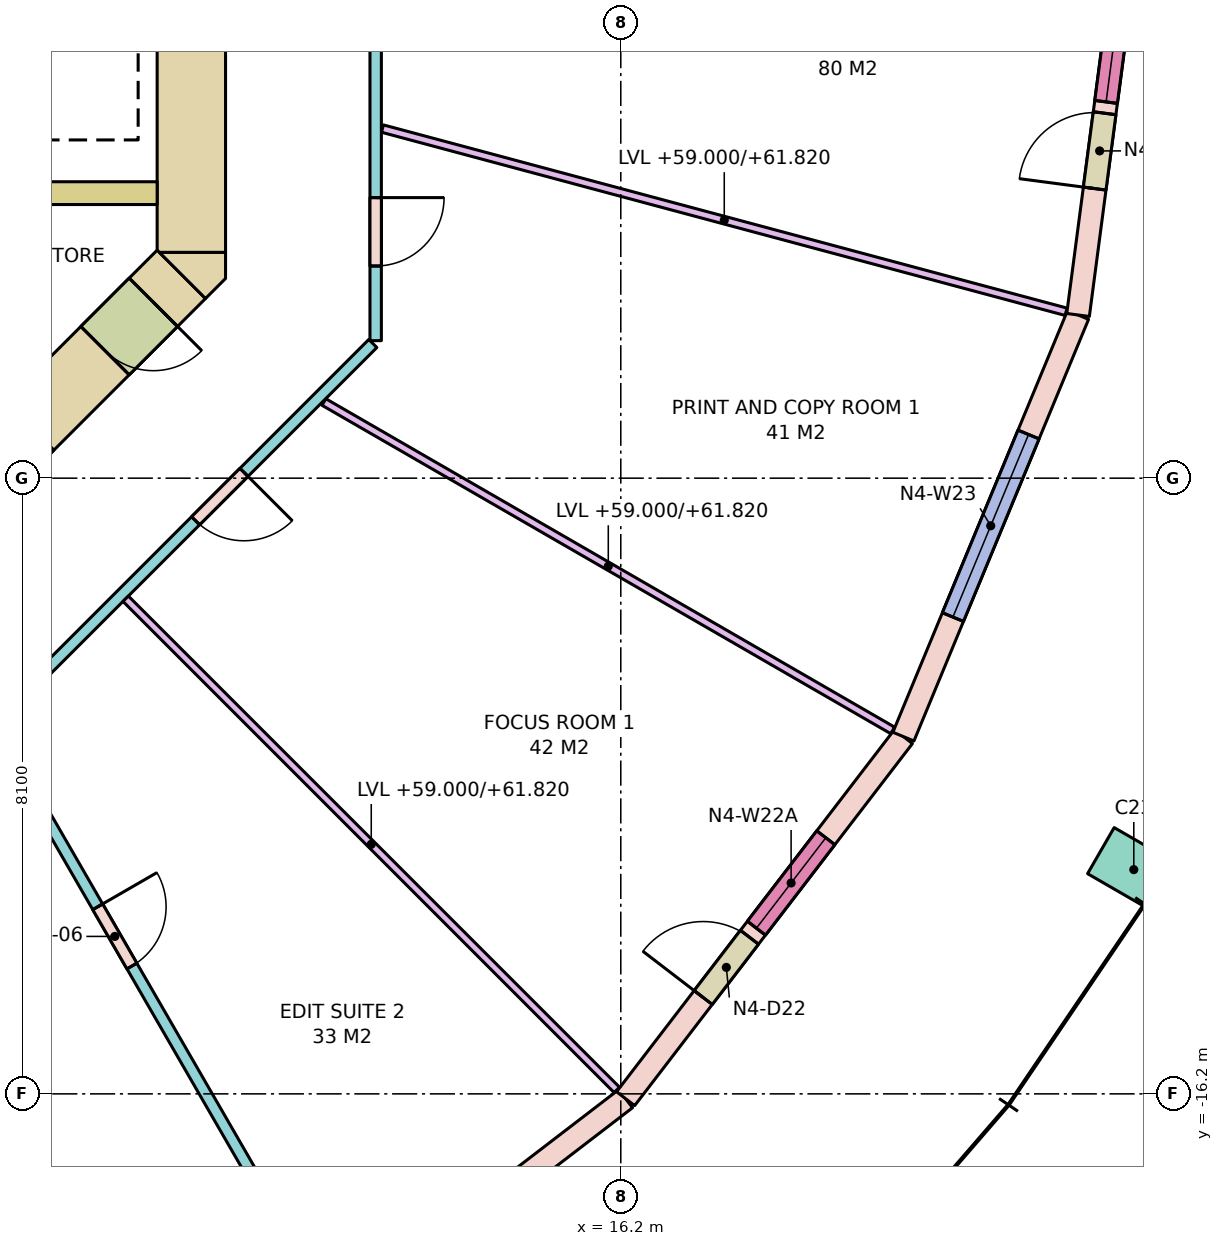
"""IFC4 building model, lengths in metres.
Left out: names, types, materials, properties, quantities, classifications, styles, units other than length and angle.
Written with IfcOpenShell. Run it as: python <this file> out.ifc"""

import sys

from ifc_helpers import new_model, si_unit, direction, frame, frame_2d, origin, origin_2d, place, context, subcontext, project, spatial, polyline, rectangle, outline, extrude, element, fill, save


model = new_model("IFC4")
c1 = context("Model", 3, precision=1e-05, world=origin(), true_north=direction((0.0, 1.0)))
c2 = subcontext(c1, "Body", "Model", "MODEL_VIEW")
j1 = project(units=[si_unit("LENGTHUNIT", "METRE"), si_unit("PLANEANGLEUNIT", "RADIAN")], contexts=[c1])
p1 = place(None, origin())
s1 = spatial("IfcSite", under=j1, at=p1, CompositionType="ELEMENT")
p2 = place(p1, origin())
s2 = spatial("IfcBuilding", under=s1, at=p2, CompositionType="ELEMENT")
p3 = place(p2, frame((0.0, 0.0, 59.0)))
s3 = spatial("IfcBuildingStorey", under=s2, at=p3, CompositionType="ELEMENT", Elevation=59.0)
p4 = place(p3, frame((22.95, -13.25, 0.0), z_axis=(0.0, 0.0, 1.0), x_axis=(0.5, 0.866025403784, 0.0)))
e1 = element("IfcColumn", 1, at=p4, inside=s3, PredefinedType="COLUMN", context=c2, shape_type="SweptSolid", body=[
    extrude(rectangle(XDim=0.7, YDim=1.0, at=origin_2d()), origin(), (0.0, 0.0, 1.0), 4.0),
])
p5 = place(p3, frame((10.55, -5.13, -0.28), z_axis=(0.0, 0.0, 1.0), x_axis=(0.0, 1.0, 0.0)))
e2 = element("IfcWall", 2, at=p5, inside=s3, PredefinedType="SHEAR", context=c2, shape_type="SweptSolid", body=[
    extrude(rectangle(XDim=10.26, YDim=0.9, at=frame_2d((5.13, 0.0))), origin(), (0.0, 0.0, 1.0), 4.0),
])
p6 = place(p5, frame((4.13, 0.0, 0.28)))
e3 = element("IfcOpeningElement", 3, at=p6, cuts=e2, PredefinedType="OPENING", context=c2, shape_type="SweptSolid", body=[
    extrude(rectangle(XDim=2.0, YDim=2.1, at=frame_2d((1.0, 1.05))), frame((0.0, 0.46, 0.0), z_axis=(0.0, -1.0, 0.0), x_axis=(1.0, 0.0, 0.0)), (0.0, 0.0, 1.0), 0.92),
])
p7 = place(p3, frame((10.418, -5.418, -0.28), z_axis=(0.0, 0.0, 1.0), x_axis=(-0.707106781187, -0.707106781187, 0.0)))
e4 = element("IfcWall", 4, at=p7, inside=s3, PredefinedType="SHEAR", context=c2, shape_type="SweptSolid", body=[
    extrude(rectangle(XDim=4.243, YDim=0.9, at=frame_2d((2.121, 0.0))), origin(), (0.0, 0.0, 1.0), 4.0),
])
p8 = place(p7, frame((2.823, 0.0, 0.28)))
e5 = element("IfcOpeningElement", 5, at=p8, cuts=e4, PredefinedType="OPENING", context=c2, shape_type="SweptSolid", body=[
    extrude(rectangle(XDim=0.9, YDim=2.1, at=frame_2d((0.45, 1.05))), frame((0.0, 0.46, 0.0), z_axis=(0.0, -1.0, 0.0), x_axis=(1.0, 0.0, 0.0)), (0.0, 0.0, 1.0), 0.92),
])
p9 = place(p7, frame((0.52, 0.0, 0.28)))
e6 = element("IfcOpeningElement", 6, at=p9, cuts=e4, PredefinedType="OPENING", context=c2, shape_type="SweptSolid", body=[
    extrude(rectangle(XDim=0.9, YDim=2.1, at=frame_2d((0.45, 1.05))), frame((0.0, 0.46, 0.0), z_axis=(0.0, -1.0, 0.0), x_axis=(1.0, 0.0, 0.0)), (0.0, 0.0, 1.0), 0.92),
])
p10 = place(p3, frame((0.0, 0.0, -0.28)))
e7 = element("IfcWall", 7, at=p10, inside=s3, PredefinedType="SHEAR", context=c2, shape_type="SweptSolid", body=[
    extrude(outline(polyline([(11.0, -5.473), (10.736, -5.736), (10.13, -5.13), (11.0, -5.13), (11.0, -5.473)])), origin(), (0.0, 0.0, 1.0), 4.0),
])
p11 = place(p3, frame((2.0, -4.35, 0.0), z_axis=(0.0, 0.0, 1.0), x_axis=(1.0, 0.0, 0.0)))
e8 = element("IfcWall", 8, at=p11, inside=s3, PredefinedType="SOLIDWALL", context=c2, shape_type="SweptSolid", body=[
    extrude(rectangle(XDim=8.1, YDim=0.3, at=frame_2d((4.05, 0.0))), origin(), (0.0, 0.0, 1.0), 3.72),
])
p12 = place(p3, frame((11.5, -19.919, 0.0), z_axis=(0.0, 0.0, 1.0), x_axis=(0.793339924758, 0.608778912074, 0.0)))
e9 = element("IfcWall", 9, at=p12, inside=s3, PredefinedType="STANDARD", context=c2, shape_type="SweptSolid", body=[
    extrude(rectangle(XDim=6.004, YDim=0.3, at=frame_2d((3.002, 0.0))), origin(), (0.0, 0.0, 1.0), 3.72),
])
p13 = place(p12, frame((1.702, 0.0, 0.8)))
e10 = element("IfcOpeningElement", 10, at=p13, cuts=e9, PredefinedType="OPENING", context=c2, shape_type="SweptSolid", body=[
    extrude(rectangle(XDim=2.6, YDim=2.7, at=frame_2d((1.3, 1.35))), frame((0.0, 0.16, 0.0), z_axis=(0.0, -1.0, 0.0), x_axis=(1.0, 0.0, 0.0)), (0.0, 0.0, 1.0), 0.32),
])
p14 = place(p3, frame((16.263, -16.263, 0.0), z_axis=(0.0, 0.0, 1.0), x_axis=(0.608778912074, 0.793339924758, 0.0)))
e11 = element("IfcWall", 11, at=p14, inside=s3, PredefinedType="STANDARD", context=c2, shape_type="SweptSolid", body=[
    extrude(rectangle(XDim=6.004, YDim=0.3, at=frame_2d((3.002, 0.0))), origin(), (0.0, 0.0, 1.0), 3.72),
])
p15 = place(p14, frame((1.677, 0.0, 0.0)))
e12 = element("IfcOpeningElement", 12, at=p15, cuts=e11, PredefinedType="OPENING", context=c2, shape_type="SweptSolid", body=[
    extrude(rectangle(XDim=1.0, YDim=2.4, at=frame_2d((0.5, 1.2))), frame((0.0, 0.16, 0.0), z_axis=(0.0, -1.0, 0.0), x_axis=(1.0, 0.0, 0.0)), (0.0, 0.0, 1.0), 0.32),
])
p16 = place(p14, frame((2.827, 0.0, 0.8)))
e13 = element("IfcOpeningElement", 13, at=p16, cuts=e11, PredefinedType="OPENING", context=c2, shape_type="SweptSolid", body=[
    extrude(rectangle(XDim=1.5, YDim=2.7, at=frame_2d((0.75, 1.35))), frame((0.0, 0.16, 0.0), z_axis=(0.0, -1.0, 0.0), x_axis=(1.0, 0.0, 0.0)), (0.0, 0.0, 1.0), 0.32),
])
p17 = place(p3, frame((19.919, -11.5, 0.0), z_axis=(0.0, 0.0, 1.0), x_axis=(0.382671411433, 0.923884511653, 0.0)))
e14 = element("IfcWall", 14, at=p17, inside=s3, PredefinedType="STANDARD", context=c2, shape_type="SweptSolid", body=[
    extrude(rectangle(XDim=6.004, YDim=0.3, at=frame_2d((3.002, 0.0))), origin(), (0.0, 0.0, 1.0), 3.72),
])
p18 = place(p17, frame((1.702, 0.0, 0.8)))
e15 = element("IfcOpeningElement", 15, at=p18, cuts=e14, PredefinedType="OPENING", context=c2, shape_type="SweptSolid", body=[
    extrude(rectangle(XDim=2.6, YDim=2.7, at=frame_2d((1.3, 1.35))), frame((0.0, 0.16, 0.0), z_axis=(0.0, -1.0, 0.0), x_axis=(1.0, 0.0, 0.0)), (0.0, 0.0, 1.0), 0.32),
])
p19 = place(p3, frame((22.216, -5.953, 0.0), z_axis=(0.0, 0.0, 1.0), x_axis=(0.130522880875, 0.991445297315, 0.0)))
e16 = element("IfcWall", 16, at=p19, inside=s3, PredefinedType="STANDARD", context=c2, shape_type="SweptSolid", body=[
    extrude(rectangle(XDim=6.004, YDim=0.3, at=frame_2d((3.002, 0.0))), origin(), (0.0, 0.0, 1.0), 3.72),
])
p20 = place(p19, frame((1.677, 0.0, 0.0)))
e17 = element("IfcOpeningElement", 17, at=p20, cuts=e16, PredefinedType="OPENING", context=c2, shape_type="SweptSolid", body=[
    extrude(rectangle(XDim=1.0, YDim=2.4, at=frame_2d((0.5, 1.2))), frame((0.0, 0.16, 0.0), z_axis=(0.0, -1.0, 0.0), x_axis=(1.0, 0.0, 0.0)), (0.0, 0.0, 1.0), 0.32),
])
p21 = place(p19, frame((2.827, 0.0, 0.8)))
e18 = element("IfcOpeningElement", 18, at=p21, cuts=e16, PredefinedType="OPENING", context=c2, shape_type="SweptSolid", body=[
    extrude(rectangle(XDim=1.5, YDim=2.7, at=frame_2d((0.75, 1.35))), frame((0.0, 0.16, 0.0), z_axis=(0.0, -1.0, 0.0), x_axis=(1.0, 0.0, 0.0)), (0.0, 0.0, 1.0), 0.32),
])
p22 = place(p3, frame((12.975, 2.234, 0.0), z_axis=(0.0, 0.0, 1.0), x_axis=(0.0, -1.0, 0.0)))
e19 = element("IfcWall", 19, at=p22, inside=s3, PredefinedType="PARTITIONING", context=c2, shape_type="SweptSolid", body=[
    extrude(rectangle(XDim=8.525, YDim=0.15, at=frame_2d((4.263, 0.0))), origin(), (0.0, 0.0, 1.0), 2.82),
])
p23 = place(p22, frame((6.643, 0.0, 0.0)))
e20 = element("IfcOpeningElement", 20, at=p23, cuts=e19, PredefinedType="OPENING", context=c2, shape_type="SweptSolid", body=[
    extrude(rectangle(XDim=0.9, YDim=2.1, at=frame_2d((0.45, 1.05))), frame((0.0, 0.085, 0.0), z_axis=(0.0, -1.0, 0.0), x_axis=(1.0, 0.0, 0.0)), (0.0, 0.0, 1.0), 0.17),
])
p24 = place(p3, frame((12.938, -6.328, 0.0), z_axis=(0.0, 0.0, 1.0), x_axis=(-0.707088206597, -0.707125355289, 0.0)))
e21 = element("IfcWall", 21, at=p24, inside=s3, PredefinedType="PARTITIONING", context=c2, shape_type="SweptSolid", body=[
    extrude(rectangle(XDim=6.572, YDim=0.15, at=frame_2d((3.286, 0.0))), origin(), (0.0, 0.0, 1.0), 2.82),
])
p25 = place(p24, frame((2.398, 0.0, 0.0)))
e22 = element("IfcOpeningElement", 22, at=p25, cuts=e21, PredefinedType="OPENING", context=c2, shape_type="SweptSolid", body=[
    extrude(rectangle(XDim=0.9, YDim=2.1, at=frame_2d((0.45, 1.05))), frame((0.0, 0.085, 0.0), z_axis=(0.0, -1.0, 0.0), x_axis=(1.0, 0.0, 0.0)), (0.0, 0.0, 1.0), 0.17),
])
p26 = place(p3, frame((7.722, -10.975, 0.0), z_axis=(0.0, 0.0, 1.0), x_axis=(0.499993290699, -0.866029277366, 0.0)))
e23 = element("IfcWall", 23, at=p26, inside=s3, PredefinedType="PARTITIONING", context=c2, shape_type="SweptSolid", body=[
    extrude(rectangle(XDim=7.283, YDim=0.15, at=frame_2d((3.641, 0.0))), origin(), (0.0, 0.0, 1.0), 3.72),
])
p27 = place(p26, frame((3.191, 0.0, 0.0)))
e24 = element("IfcOpeningElement", 24, at=p27, cuts=e23, PredefinedType="OPENING", context=c2, shape_type="SweptSolid", body=[
    extrude(rectangle(XDim=0.9, YDim=2.1, at=frame_2d((0.45, 1.05))), frame((0.0, 0.085, 0.0), z_axis=(0.0, -1.0, 0.0), x_axis=(1.0, 0.0, 0.0)), (0.0, 0.0, 1.0), 0.17),
])
p28 = place(p3, frame((9.285, -18.482, 0.0), z_axis=(0.0, 0.0, 1.0), x_axis=(-0.500010122307, 0.866019559589, 0.0)))
e25 = element("IfcWall", 25, at=p28, inside=s3, PredefinedType="PARTITIONING", context=c2, shape_type="SweptSolid", body=[
    extrude(rectangle(XDim=8.669, YDim=0.15, at=frame_2d((4.334, 0.0))), origin(), (0.0, 0.0, 1.0), 3.72),
])
p29 = place(p3, frame((9.686, -9.686, 0.0), z_axis=(0.0, 0.0, 1.0), x_axis=(0.707106781187, -0.707106781187, 0.0)))
e26 = element("IfcWall", 26, at=p29, inside=s3, PredefinedType="PARTITIONING", context=c2, shape_type="SweptSolid", body=[
    extrude(rectangle(XDim=9.138, YDim=0.1, at=frame_2d((4.569, 0.0))), origin(), (0.0, 0.0, 1.0), 2.82),
])
p30 = place(p3, frame((12.294, -7.098, 0.0), z_axis=(0.0, 0.0, 1.0), x_axis=(0.866010547425, -0.500025731086, 0.0)))
e27 = element("IfcWall", 27, at=p30, inside=s3, PredefinedType="PARTITIONING", context=c2, shape_type="SweptSolid", body=[
    extrude(rectangle(XDim=8.641, YDim=0.1, at=frame_2d((4.32, 0.0))), origin(), (0.0, 0.0, 1.0), 2.82),
])
p31 = place(p3, frame((13.064, -3.5, 0.0), z_axis=(0.0, 0.0, 1.0), x_axis=(0.965922655056, -0.258830880017, 0.0)))
e28 = element("IfcWall", 28, at=p31, inside=s3, PredefinedType="PARTITIONING", context=c2, shape_type="SweptSolid", body=[
    extrude(rectangle(XDim=9.312, YDim=0.1, at=frame_2d((4.656, 0.0))), origin(), (0.0, 0.0, 1.0), 2.82),
])
p32 = place(p15, origin())
e29 = element("IfcDoor", 29, at=p32, inside=s3, OperationType="SINGLE_SWING_LEFT", PredefinedType="DOOR", context=c2, shape_type="SweptSolid", body=[
    extrude(rectangle(XDim=1.0, YDim=2.4, at=frame_2d((0.5, 1.2))), frame((0.0, 0.025, 0.0), z_axis=(0.0, -1.0, 0.0), x_axis=(1.0, 0.0, 0.0)), (0.0, 0.0, 1.0), 0.05),
])
fill(e12, e29)
p33 = place(p16, origin())
e30 = element("IfcWindow", 30, at=p33, inside=s3, PartitioningType="SINGLE_PANEL", PredefinedType="WINDOW", context=c2, shape_type="SweptSolid", body=[
    extrude(rectangle(XDim=1.5, YDim=2.7, at=frame_2d((0.75, 1.35))), frame((0.0, 0.03, 0.0), z_axis=(0.0, -1.0, 0.0), x_axis=(1.0, 0.0, 0.0)), (0.0, 0.0, 1.0), 0.06),
])
fill(e13, e30)
p34 = place(p18, origin())
e31 = element("IfcWindow", 31, at=p34, inside=s3, PartitioningType="SINGLE_PANEL", PredefinedType="WINDOW", context=c2, shape_type="SweptSolid", body=[
    extrude(rectangle(XDim=2.6, YDim=2.7, at=frame_2d((1.3, 1.35))), frame((0.0, 0.03, 0.0), z_axis=(0.0, -1.0, 0.0), x_axis=(1.0, 0.0, 0.0)), (0.0, 0.0, 1.0), 0.06),
])
fill(e15, e31)
p35 = place(p20, origin())
e32 = element("IfcDoor", 32, at=p35, inside=s3, OperationType="SINGLE_SWING_LEFT", PredefinedType="DOOR", context=c2, shape_type="SweptSolid", body=[
    extrude(rectangle(XDim=1.0, YDim=2.4, at=frame_2d((0.5, 1.2))), frame((0.0, 0.025, 0.0), z_axis=(0.0, -1.0, 0.0), x_axis=(1.0, 0.0, 0.0)), (0.0, 0.0, 1.0), 0.05),
])
fill(e17, e32)
p36 = place(p21, origin())
e33 = element("IfcWindow", 33, at=p36, inside=s3, PartitioningType="SINGLE_PANEL", PredefinedType="WINDOW", context=c2, shape_type="SweptSolid", body=[
    extrude(rectangle(XDim=1.5, YDim=2.7, at=frame_2d((0.75, 1.35))), frame((0.0, 0.03, 0.0), z_axis=(0.0, -1.0, 0.0), x_axis=(1.0, 0.0, 0.0)), (0.0, 0.0, 1.0), 0.06),
])
fill(e18, e33)
p37 = place(p9, origin())
e34 = element("IfcDoor", 34, at=p37, inside=s3, OperationType="SINGLE_SWING_LEFT", PredefinedType="DOOR", context=c2, shape_type="SweptSolid", body=[
    extrude(rectangle(XDim=0.9, YDim=2.1, at=frame_2d((0.45, 1.05))), frame((0.0, 0.025, 0.0), z_axis=(0.0, -1.0, 0.0), x_axis=(1.0, 0.0, 0.0)), (0.0, 0.0, 1.0), 0.05),
])
fill(e6, e34)
p38 = place(p27, origin())
e35 = element("IfcDoor", 35, at=p38, inside=s3, OperationType="SINGLE_SWING_LEFT", PredefinedType="DOOR", context=c2, shape_type="SweptSolid", body=[
    extrude(rectangle(XDim=0.9, YDim=2.1, at=frame_2d((0.45, 1.05))), frame((0.0, 0.025, 0.0), z_axis=(0.0, -1.0, 0.0), x_axis=(1.0, 0.0, 0.0)), (0.0, 0.0, 1.0), 0.05),
])
fill(e24, e35)
p39 = place(p25, origin())
e36 = element("IfcDoor", 36, at=p39, inside=s3, OperationType="SINGLE_SWING_LEFT", PredefinedType="DOOR", context=c2, shape_type="SweptSolid", body=[
    extrude(rectangle(XDim=0.9, YDim=2.1, at=frame_2d((0.45, 1.05))), frame((0.0, 0.025, 0.0), z_axis=(0.0, -1.0, 0.0), x_axis=(1.0, 0.0, 0.0)), (0.0, 0.0, 1.0), 0.05),
])
fill(e22, e36)
p40 = place(p23, origin())
e37 = element("IfcDoor", 37, at=p40, inside=s3, OperationType="SINGLE_SWING_LEFT", PredefinedType="DOOR", context=c2, shape_type="SweptSolid", body=[
    extrude(rectangle(XDim=0.9, YDim=2.1, at=frame_2d((0.45, 1.05))), frame((0.0, 0.025, 0.0), z_axis=(0.0, -1.0, 0.0), x_axis=(1.0, 0.0, 0.0)), (0.0, 0.0, 1.0), 0.05),
])
fill(e20, e37)
save(model, sys.argv[1])
